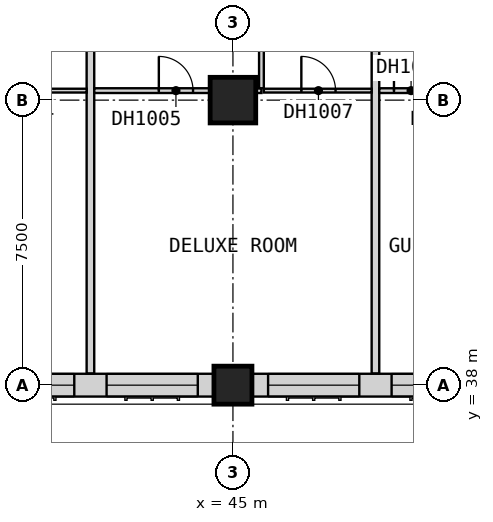
"""IFC4 building model, lengths in metres.
Left out: names, types, materials, properties, quantities, classifications, styles, units other than length and angle.
Written with IfcOpenShell. Run it as: python <this file> out.ifc"""

import sys

from ifc_helpers import new_model, si_unit, direction, frame, frame_2d, origin, origin_2d, place, context, subcontext, project, spatial, rectangle, extrude, element, fill, save


model = new_model("IFC4")
c1 = context("Model", 3, precision=1e-05, world=origin(), true_north=direction((0.0, 1.0)))
c2 = subcontext(c1, "Body", "Model", "MODEL_VIEW")
j1 = project(units=[si_unit("LENGTHUNIT", "METRE"), si_unit("PLANEANGLEUNIT", "RADIAN")], contexts=[c1])
p1 = place(None, origin())
s1 = spatial("IfcSite", under=j1, at=p1, CompositionType="ELEMENT")
p2 = place(p1, origin())
s2 = spatial("IfcBuilding", under=s1, at=p2, CompositionType="ELEMENT")
p3 = place(p2, frame((0.0, 0.0, 48.4)))
s3 = spatial("IfcBuildingStorey", under=s2, at=p3, CompositionType="ELEMENT", Elevation=48.4)
p4 = place(p3, frame((45.0, 38.0, 0.0), z_axis=(0.0, 0.0, 1.0), x_axis=(1.0, 0.0, 0.0)))
e1 = element("IfcColumn", 1, at=p4, inside=s3, PredefinedType="COLUMN", context=c2, shape_type="SweptSolid", body=[
    extrude(rectangle(XDim=1.0, YDim=1.0, at=origin_2d()), origin(), (0.0, 0.0, 1.0), 3.6),
])
p5 = place(p3, frame((45.0, 45.5, 0.0), z_axis=(0.0, 0.0, 1.0), x_axis=(1.0, 0.0, 0.0)))
e2 = element("IfcColumn", 2, at=p5, inside=s3, PredefinedType="COLUMN", context=c2, shape_type="SweptSolid", body=[
    extrude(rectangle(XDim=1.2, YDim=1.2, at=origin_2d()), origin(), (0.0, 0.0, 1.0), 3.6),
])
p6 = place(p3, frame((38.0, 38.0, 0.0), z_axis=(0.0, 0.0, 1.0), x_axis=(1.0, 0.0, 0.0)))
e3 = element("IfcWall", 3, at=p6, inside=s3, PredefinedType="SOLIDWALL", context=c2, shape_type="SweptSolid", body=[
    extrude(rectangle(XDim=6.5, YDim=0.6, at=frame_2d((3.25, 0.0))), origin(), (0.0, 0.0, 1.0), 2.85),
])
p7 = place(p6, frame((0.425, 0.0, 0.8)))
e4 = element("IfcOpeningElement", 4, at=p7, cuts=e3, PredefinedType="OPENING", context=c2, shape_type="SweptSolid", body=[
    extrude(rectangle(XDim=2.4, YDim=1.8, at=frame_2d((1.2, 0.9))), frame((0.0, 0.31, 0.0), z_axis=(0.0, -1.0, 0.0), x_axis=(1.0, 0.0, 0.0)), (0.0, 0.0, 1.0), 0.62),
])
p8 = place(p6, frame((3.675, 0.0, 0.8)))
e5 = element("IfcOpeningElement", 5, at=p8, cuts=e3, PredefinedType="OPENING", context=c2, shape_type="SweptSolid", body=[
    extrude(rectangle(XDim=2.4, YDim=1.8, at=frame_2d((1.2, 0.9))), frame((0.0, 0.31, 0.0), z_axis=(0.0, -1.0, 0.0), x_axis=(1.0, 0.0, 0.0)), (0.0, 0.0, 1.0), 0.62),
])
p9 = place(p3, frame((45.5, 38.0, 0.0), z_axis=(0.0, 0.0, 1.0), x_axis=(1.0, 0.0, 0.0)))
e6 = element("IfcWall", 6, at=p9, inside=s3, PredefinedType="SOLIDWALL", context=c2, shape_type="SweptSolid", body=[
    extrude(rectangle(XDim=6.5, YDim=0.6, at=frame_2d((3.25, 0.0))), origin(), (0.0, 0.0, 1.0), 2.85),
])
p10 = place(p9, frame((0.425, 0.0, 0.8)))
e7 = element("IfcOpeningElement", 7, at=p10, cuts=e6, PredefinedType="OPENING", context=c2, shape_type="SweptSolid", body=[
    extrude(rectangle(XDim=2.4, YDim=1.8, at=frame_2d((1.2, 0.9))), frame((0.0, 0.31, 0.0), z_axis=(0.0, -1.0, 0.0), x_axis=(1.0, 0.0, 0.0)), (0.0, 0.0, 1.0), 0.62),
])
p11 = place(p9, frame((3.675, 0.0, 0.8)))
e8 = element("IfcOpeningElement", 8, at=p11, cuts=e6, PredefinedType="OPENING", context=c2, shape_type="SweptSolid", body=[
    extrude(rectangle(XDim=2.4, YDim=1.8, at=frame_2d((1.2, 0.9))), frame((0.0, 0.31, 0.0), z_axis=(0.0, -1.0, 0.0), x_axis=(1.0, 0.0, 0.0)), (0.0, 0.0, 1.0), 0.62),
])
for number, where, z_axis, x_axis in (
    (9, (41.25, 38.31, 0.0), (0.0, 0.0, 1.0), (0.0, 1.0, 0.0)),
    (10, (48.75, 38.31, 0.0), (0.0, 0.0, 1.0), (0.0, 1.0, 0.0)),
):
    element("IfcWall", number, at=place(p3, frame(where, z_axis=z_axis, x_axis=x_axis)), inside=s3, PredefinedType="PARTITIONING", context=c2, shape_type="SweptSolid", body=[
        extrude(rectangle(XDim=11.715, YDim=0.2, at=frame_2d((5.857, 0.0))), origin(), (0.0, 0.0, 1.0), 3.35),
    ])
p12 = place(p3, frame((33.812, 45.75, 0.0), z_axis=(0.0, 0.0, 1.0), x_axis=(1.0, 0.0, 0.0)))
e11 = element("IfcWall", 11, at=p12, inside=s3, PredefinedType="PARTITIONING", context=c2, shape_type="SweptSolid", body=[
    extrude(rectangle(XDim=7.337, YDim=0.1, at=frame_2d((3.669, 0.0))), origin(), (0.0, 0.0, 1.0), 3.35),
])
p13 = place(p12, frame((5.113, 0.0, 0.0)))
e12 = element("IfcOpeningElement", 12, at=p13, cuts=e11, PredefinedType="OPENING", context=c2, shape_type="SweptSolid", body=[
    extrude(rectangle(XDim=0.9, YDim=2.1, at=frame_2d((0.45, 1.05))), frame((0.0, 0.06, 0.0), z_axis=(0.0, -1.0, 0.0), x_axis=(1.0, 0.0, 0.0)), (0.0, 0.0, 1.0), 0.12),
])
p14 = place(p3, frame((45.812, 45.75, 0.0), z_axis=(0.0, 0.0, 1.0), x_axis=(1.0, 0.0, 0.0)))
e13 = element("IfcWall", 13, at=p14, inside=s3, PredefinedType="PARTITIONING", context=c2, shape_type="SweptSolid", body=[
    extrude(rectangle(XDim=2.837, YDim=0.1, at=frame_2d((1.419, 0.0))), origin(), (0.0, 0.0, 1.0), 3.35),
])
p15 = place(p14, frame((0.988, 0.0, 0.0)))
e14 = element("IfcOpeningElement", 14, at=p15, cuts=e13, PredefinedType="OPENING", context=c2, shape_type="SweptSolid", body=[
    extrude(rectangle(XDim=0.9, YDim=2.1, at=frame_2d((0.45, 1.05))), frame((0.0, 0.06, 0.0), z_axis=(0.0, -1.0, 0.0), x_axis=(1.0, 0.0, 0.0)), (0.0, 0.0, 1.0), 0.12),
])
p16 = place(p3, frame((41.35, 45.75, 0.0), z_axis=(0.0, 0.0, 1.0), x_axis=(1.0, 0.0, 0.0)))
e15 = element("IfcWall", 15, at=p16, inside=s3, PredefinedType="PARTITIONING", context=c2, shape_type="SweptSolid", body=[
    extrude(rectangle(XDim=4.4, YDim=0.125, at=frame_2d((2.2, 0.0))), origin(), (0.0, 0.0, 1.0), 3.35),
])
p17 = place(p16, frame((1.7, 0.0, 0.0)))
e16 = element("IfcOpeningElement", 16, at=p17, cuts=e15, PredefinedType="OPENING", context=c2, shape_type="SweptSolid", body=[
    extrude(rectangle(XDim=0.9, YDim=2.1, at=frame_2d((0.45, 1.05))), frame((0.0, 0.073, 0.0), z_axis=(0.0, -1.0, 0.0), x_axis=(1.0, 0.0, 0.0)), (0.0, 0.0, 1.0), 0.145),
])
p18 = place(p3, frame((48.85, 45.75, 0.0), z_axis=(0.0, 0.0, 1.0), x_axis=(1.0, 0.0, 0.0)))
e17 = element("IfcWall", 17, at=p18, inside=s3, PredefinedType="PARTITIONING", context=c2, shape_type="SweptSolid", body=[
    extrude(rectangle(XDim=1.775, YDim=0.125, at=frame_2d((0.887, 0.0))), origin(), (0.0, 0.0, 1.0), 3.35),
])
p19 = place(p18, frame((0.387, 0.0, 0.0)))
e18 = element("IfcOpeningElement", 18, at=p19, cuts=e17, PredefinedType="OPENING", context=c2, shape_type="SweptSolid", body=[
    extrude(rectangle(XDim=0.9, YDim=2.1, at=frame_2d((0.45, 1.05))), frame((0.0, 0.073, 0.0), z_axis=(0.0, -1.0, 0.0), x_axis=(1.0, 0.0, 0.0)), (0.0, 0.0, 1.0), 0.145),
])
p20 = place(p3, frame((45.75, 45.812, 0.0), z_axis=(0.0, 0.0, 1.0), x_axis=(0.0, 1.0, 0.0)))
e19 = element("IfcWall", 19, at=p20, inside=s3, PredefinedType="PARTITIONING", context=c2, shape_type="SweptSolid", body=[
    extrude(rectangle(XDim=4.212, YDim=0.125, at=frame_2d((2.106, 0.0))), origin(), (0.0, 0.0, 1.0), 3.35),
])
p21 = place(p7, origin())
e20 = element("IfcWindow", 20, at=p21, inside=s3, PartitioningType="SINGLE_PANEL", PredefinedType="WINDOW", context=c2, shape_type="SweptSolid", body=[
    extrude(rectangle(XDim=2.4, YDim=1.8, at=frame_2d((1.2, 0.9))), frame((0.0, -0.07, 0.0), z_axis=(0.0, -1.0, 0.0), x_axis=(1.0, 0.0, 0.0)), (0.0, 0.0, 1.0), 0.06),
])
fill(e4, e20)
p22 = place(p8, origin())
e21 = element("IfcWindow", 21, at=p22, inside=s3, PartitioningType="SINGLE_PANEL", PredefinedType="WINDOW", context=c2, shape_type="SweptSolid", body=[
    extrude(rectangle(XDim=2.4, YDim=1.8, at=frame_2d((1.2, 0.9))), frame((0.0, -0.07, 0.0), z_axis=(0.0, -1.0, 0.0), x_axis=(1.0, 0.0, 0.0)), (0.0, 0.0, 1.0), 0.06),
])
fill(e5, e21)
p23 = place(p10, origin())
e22 = element("IfcWindow", 22, at=p23, inside=s3, PartitioningType="SINGLE_PANEL", PredefinedType="WINDOW", context=c2, shape_type="SweptSolid", body=[
    extrude(rectangle(XDim=2.4, YDim=1.8, at=frame_2d((1.2, 0.9))), frame((0.0, -0.07, 0.0), z_axis=(0.0, -1.0, 0.0), x_axis=(1.0, 0.0, 0.0)), (0.0, 0.0, 1.0), 0.06),
])
fill(e7, e22)
p24 = place(p11, origin())
e23 = element("IfcWindow", 23, at=p24, inside=s3, PartitioningType="SINGLE_PANEL", PredefinedType="WINDOW", context=c2, shape_type="SweptSolid", body=[
    extrude(rectangle(XDim=2.4, YDim=1.8, at=frame_2d((1.2, 0.9))), frame((0.0, -0.07, 0.0), z_axis=(0.0, -1.0, 0.0), x_axis=(1.0, 0.0, 0.0)), (0.0, 0.0, 1.0), 0.06),
])
fill(e8, e23)
p25 = place(p17, origin())
e24 = element("IfcDoor", 24, at=p25, inside=s3, OperationType="SINGLE_SWING_LEFT", PredefinedType="DOOR", context=c2, shape_type="SweptSolid", body=[
    extrude(rectangle(XDim=0.9, YDim=2.1, at=frame_2d((0.45, 1.05))), frame((0.0, 0.025, 0.0), z_axis=(0.0, -1.0, 0.0), x_axis=(1.0, 0.0, 0.0)), (0.0, 0.0, 1.0), 0.05),
])
fill(e16, e24)
p26 = place(p15, origin())
e25 = element("IfcDoor", 25, at=p26, inside=s3, OperationType="SINGLE_SWING_LEFT", PredefinedType="DOOR", context=c2, shape_type="SweptSolid", body=[
    extrude(rectangle(XDim=0.9, YDim=2.1, at=frame_2d((0.45, 1.05))), frame((0.0, 0.025, 0.0), z_axis=(0.0, -1.0, 0.0), x_axis=(1.0, 0.0, 0.0)), (0.0, 0.0, 1.0), 0.05),
])
fill(e14, e25)
p27 = place(p19, origin())
e26 = element("IfcDoor", 26, at=p27, inside=s3, OperationType="SINGLE_SWING_LEFT", PredefinedType="DOOR", context=c2, shape_type="SweptSolid", body=[
    extrude(rectangle(XDim=0.9, YDim=2.1, at=frame_2d((0.45, 1.05))), frame((0.0, 0.025, 0.0), z_axis=(0.0, -1.0, 0.0), x_axis=(1.0, 0.0, 0.0)), (0.0, 0.0, 1.0), 0.05),
])
fill(e18, e26)
save(model, sys.argv[1])
